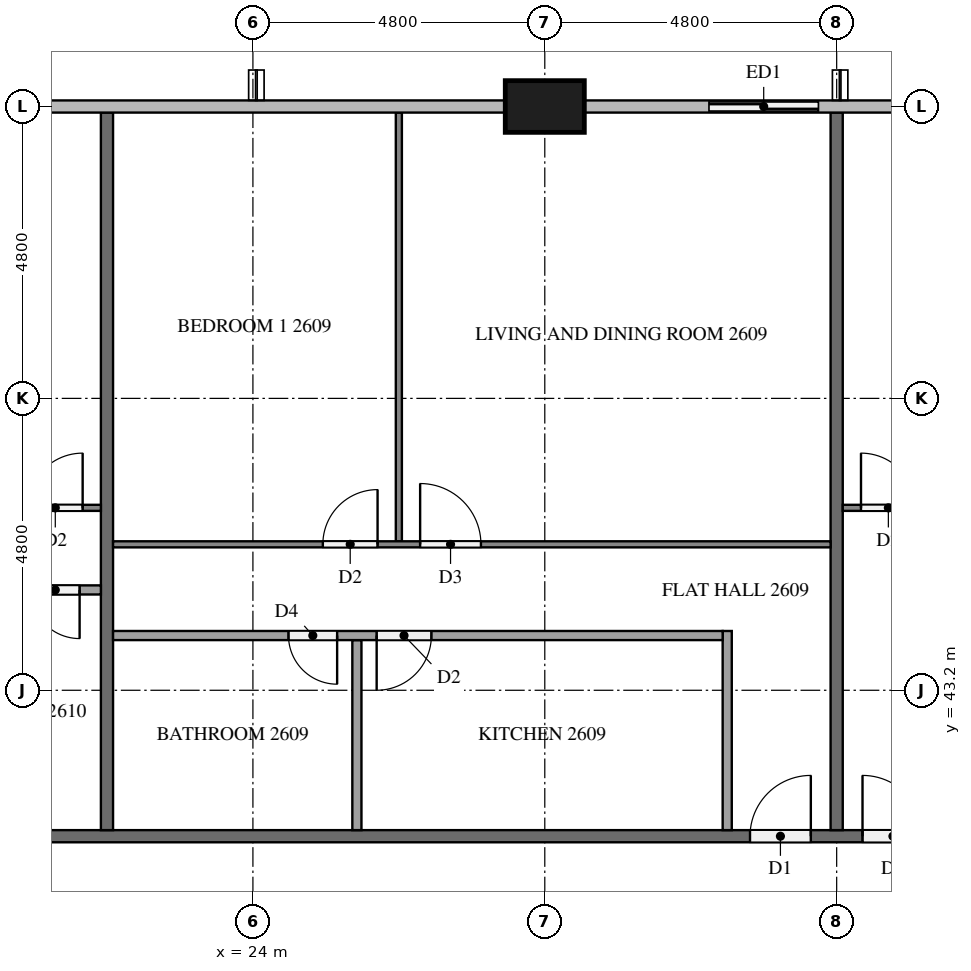
"""IFC4 building model, lengths in metres.
Left out: names, types, materials, properties, quantities, classifications, styles, units other than length and angle.
Written with IfcOpenShell. Run it as: python <this file> out.ifc"""

import sys

from ifc_helpers import new_model, si_unit, direction, frame, frame_2d, origin, origin_2d, place, context, subcontext, project, spatial, rectangle, extrude, element, fill, save


model = new_model("IFC4")
c1 = context("Model", 3, precision=1e-05, world=origin(), true_north=direction((0.0, 1.0)))
c2 = subcontext(c1, "Body", "Model", "MODEL_VIEW")
j1 = project(units=[si_unit("LENGTHUNIT", "METRE"), si_unit("PLANEANGLEUNIT", "RADIAN")], contexts=[c1])
p1 = place(None, origin())
s1 = spatial("IfcSite", under=j1, at=p1, CompositionType="ELEMENT")
p2 = place(p1, origin())
s2 = spatial("IfcBuilding", under=s1, at=p2, CompositionType="ELEMENT")
p3 = place(p2, frame((0.0, 0.0, 103.2)))
s3 = spatial("IfcBuildingStorey", under=s2, at=p3, CompositionType="ELEMENT", Elevation=103.2)
p4 = place(p3, frame((28.8, 52.8, 0.0), z_axis=(0.0, 0.0, 1.0), x_axis=(1.0, 0.0, 0.0)))
e1 = element("IfcColumn", 1, at=p4, inside=s3, PredefinedType="COLUMN", context=c2, shape_type="SweptSolid", body=[
    extrude(rectangle(XDim=1.3, YDim=0.85, at=origin_2d()), origin(), (0.0, 0.0, 1.0), 3.2),
])
p5 = place(p3, frame((33.6, 52.8, 0.0), z_axis=(0.0, 0.0, 1.0), x_axis=(-1.0, 0.0, 0.0)))
e2 = element("IfcWall", 2, at=p5, inside=s3, PredefinedType="SOLIDWALL", context=c2, shape_type="SweptSolid", body=[
    extrude(rectangle(XDim=2.4, YDim=0.15, at=frame_2d((1.2, 0.0))), origin(), (0.0, 0.0, 1.0), 3.2),
])
p6 = place(p5, frame((0.3, 0.0, 0.0)))
e3 = element("IfcOpeningElement", 3, at=p6, cuts=e2, PredefinedType="OPENING", context=c2, shape_type="SweptSolid", body=[
    extrude(rectangle(XDim=1.8, YDim=2.4, at=frame_2d((0.9, 1.2))), frame((0.0, 0.085, 0.0), z_axis=(0.0, -1.0, 0.0), x_axis=(1.0, 0.0, 0.0)), (0.0, 0.0, 1.0), 0.17),
])
p7 = place(p3, frame((11.9, 40.8, 0.0), z_axis=(0.0, 0.0, 1.0), x_axis=(1.0, 0.0, 0.0)))
e4 = element("IfcWall", 4, at=p7, inside=s3, PredefinedType="PARTITIONING", context=c2, shape_type="SweptSolid", body=[
    extrude(rectangle(XDim=38.6, YDim=0.2, at=frame_2d((19.3, 0.0))), origin(), (0.0, 0.0, 1.0), 3.2),
])
p8 = place(p7, frame((22.125, 0.0, 0.0)))
e5 = element("IfcOpeningElement", 5, at=p8, cuts=e4, PredefinedType="OPENING", context=c2, shape_type="SweptSolid", body=[
    extrude(rectangle(XDim=1.0, YDim=2.1, at=frame_2d((0.5, 1.05))), frame((0.0, 0.11, 0.0), z_axis=(0.0, -1.0, 0.0), x_axis=(1.0, 0.0, 0.0)), (0.0, 0.0, 1.0), 0.22),
])
p9 = place(p7, frame((20.275, 0.0, 0.0)))
e6 = element("IfcOpeningElement", 6, at=p9, cuts=e4, PredefinedType="OPENING", context=c2, shape_type="SweptSolid", body=[
    extrude(rectangle(XDim=1.0, YDim=2.1, at=frame_2d((0.5, 1.05))), frame((0.0, 0.11, 0.0), z_axis=(0.0, -1.0, 0.0), x_axis=(1.0, 0.0, 0.0)), (0.0, 0.0, 1.0), 0.22),
])
p10 = place(p7, frame((0.525, 0.0, 0.0)))
e7 = element("IfcOpeningElement", 7, at=p10, cuts=e4, PredefinedType="OPENING", context=c2, shape_type="SweptSolid", body=[
    extrude(rectangle(XDim=1.0, YDim=2.1, at=frame_2d((0.5, 1.05))), frame((0.0, 0.11, 0.0), z_axis=(0.0, -1.0, 0.0), x_axis=(1.0, 0.0, 0.0)), (0.0, 0.0, 1.0), 0.22),
])
for number, where, z_axis, x_axis in (
    (8, (33.6, 52.7, 0.0), (0.0, 0.0, 1.0), (0.0, -1.0, 0.0)),
    (9, (21.6, 52.7, 0.0), (0.0, 0.0, 1.0), (0.0, -1.0, 0.0)),
):
    element("IfcWall", number, at=place(p3, frame(where, z_axis=z_axis, x_axis=x_axis)), inside=s3, PredefinedType="PARTITIONING", context=c2, shape_type="SweptSolid", body=[
        extrude(rectangle(XDim=11.8, YDim=0.2, at=frame_2d((5.9, 0.0))), origin(), (0.0, 0.0, 1.0), 3.2),
    ])
p11 = place(p3, frame((33.7, 46.2, 0.0), z_axis=(0.0, 0.0, 1.0), x_axis=(1.0, 0.0, 0.0)))
e10 = element("IfcWall", 10, at=p11, inside=s3, PredefinedType="PARTITIONING", context=c2, shape_type="SweptSolid", body=[
    extrude(rectangle(XDim=16.6, YDim=0.1, at=frame_2d((8.3, 0.0))), origin(), (0.0, 0.0, 1.0), 3.2),
])
p12 = place(p11, frame((0.3, 0.0, 0.0)))
e11 = element("IfcOpeningElement", 11, at=p12, cuts=e10, PredefinedType="OPENING", context=c2, shape_type="SweptSolid", body=[
    extrude(rectangle(XDim=0.9, YDim=2.1, at=frame_2d((0.45, 1.05))), frame((0.0, 0.06, 0.0), z_axis=(0.0, -1.0, 0.0), x_axis=(1.0, 0.0, 0.0)), (0.0, 0.0, 1.0), 0.12),
])
p13 = place(p11, frame((10.55, 0.0, 0.0)))
e12 = element("IfcOpeningElement", 12, at=p13, cuts=e10, PredefinedType="OPENING", context=c2, shape_type="SweptSolid", body=[
    extrude(rectangle(XDim=1.0, YDim=2.1, at=frame_2d((0.5, 1.05))), frame((0.0, 0.06, 0.0), z_axis=(0.0, -1.0, 0.0), x_axis=(1.0, 0.0, 0.0)), (0.0, 0.0, 1.0), 0.12),
])
p14 = place(p11, frame((12.25, 0.0, 0.0)))
e13 = element("IfcOpeningElement", 13, at=p14, cuts=e10, PredefinedType="OPENING", context=c2, shape_type="SweptSolid", body=[
    extrude(rectangle(XDim=0.9, YDim=2.1, at=frame_2d((0.45, 1.05))), frame((0.0, 0.06, 0.0), z_axis=(0.0, -1.0, 0.0), x_axis=(1.0, 0.0, 0.0)), (0.0, 0.0, 1.0), 0.12),
])
p15 = place(p3, frame((26.4, 45.65, 0.0), z_axis=(0.0, 0.0, 1.0), x_axis=(0.0, 1.0, 0.0)))
e14 = element("IfcWall", 14, at=p15, inside=s3, PredefinedType="PARTITIONING", context=c2, shape_type="SweptSolid", body=[
    extrude(rectangle(XDim=7.05, YDim=0.1, at=frame_2d((3.525, 0.0))), origin(), (0.0, 0.0, 1.0), 3.2),
])
p16 = place(p3, frame((21.7, 45.6, 0.0), z_axis=(0.0, 0.0, 1.0), x_axis=(1.0, 0.0, 0.0)))
e15 = element("IfcWall", 15, at=p16, inside=s3, PredefinedType="PARTITIONING", context=c2, shape_type="SweptSolid", body=[
    extrude(rectangle(XDim=11.8, YDim=0.1, at=frame_2d((5.9, 0.0))), origin(), (0.0, 0.0, 1.0), 3.2),
])
p17 = place(p16, frame((5.05, 0.0, 0.0)))
e16 = element("IfcOpeningElement", 16, at=p17, cuts=e15, PredefinedType="OPENING", context=c2, shape_type="SweptSolid", body=[
    extrude(rectangle(XDim=1.0, YDim=2.1, at=frame_2d((0.5, 1.05))), frame((0.0, 0.06, 0.0), z_axis=(0.0, -1.0, 0.0), x_axis=(1.0, 0.0, 0.0)), (0.0, 0.0, 1.0), 0.12),
])
p18 = place(p16, frame((3.45, 0.0, 0.0)))
e17 = element("IfcOpeningElement", 17, at=p18, cuts=e15, PredefinedType="OPENING", context=c2, shape_type="SweptSolid", body=[
    extrude(rectangle(XDim=0.9, YDim=2.1, at=frame_2d((0.45, 1.05))), frame((0.0, 0.06, 0.0), z_axis=(0.0, -1.0, 0.0), x_axis=(1.0, 0.0, 0.0)), (0.0, 0.0, 1.0), 0.12),
])
p19 = place(p3, frame((25.71, 40.9, 0.0), z_axis=(0.0, 0.0, 1.0), x_axis=(0.0, 1.0, 0.0)))
e18 = element("IfcWall", 18, at=p19, inside=s3, PredefinedType="PARTITIONING", context=c2, shape_type="SweptSolid", body=[
    extrude(rectangle(XDim=3.125, YDim=0.15, at=frame_2d((1.562, 0.0))), origin(), (0.0, 0.0, 1.0), 3.2),
])
p20 = place(p3, frame((31.8, 40.9, 0.0), z_axis=(0.0, 0.0, 1.0), x_axis=(0.0, 1.0, 0.0)))
e19 = element("IfcWall", 19, at=p20, inside=s3, PredefinedType="PARTITIONING", context=c2, shape_type="SweptSolid", body=[
    extrude(rectangle(XDim=3.275, YDim=0.15, at=frame_2d((1.638, 0.0))), origin(), (0.0, 0.0, 1.0), 3.2),
])
p21 = place(p3, frame((31.725, 44.1, 0.0), z_axis=(0.0, 0.0, 1.0), x_axis=(-1.0, 0.0, 0.0)))
e20 = element("IfcWall", 20, at=p21, inside=s3, PredefinedType="PARTITIONING", context=c2, shape_type="SweptSolid", body=[
    extrude(rectangle(XDim=10.025, YDim=0.15, at=frame_2d((5.013, 0.0))), origin(), (0.0, 0.0, 1.0), 3.2),
])
p22 = place(p21, frame((4.79, 0.0, 0.0)))
e21 = element("IfcOpeningElement", 21, at=p22, cuts=e20, PredefinedType="OPENING", context=c2, shape_type="SweptSolid", body=[
    extrude(rectangle(XDim=0.9, YDim=2.1, at=frame_2d((0.45, 1.05))), frame((0.0, 0.085, 0.0), z_axis=(0.0, -1.0, 0.0), x_axis=(1.0, 0.0, 0.0)), (0.0, 0.0, 1.0), 0.17),
])
p23 = place(p21, frame((6.34, 0.0, 0.0)))
e22 = element("IfcOpeningElement", 22, at=p23, cuts=e20, PredefinedType="OPENING", context=c2, shape_type="SweptSolid", body=[
    extrude(rectangle(XDim=0.8, YDim=2.1, at=frame_2d((0.4, 1.05))), frame((0.0, 0.085, 0.0), z_axis=(0.0, -1.0, 0.0), x_axis=(1.0, 0.0, 0.0)), (0.0, 0.0, 1.0), 0.17),
])
p24 = place(p3, frame((12.1, 46.2, 0.0), z_axis=(0.0, 0.0, 1.0), x_axis=(1.0, 0.0, 0.0)))
e23 = element("IfcWall", 23, at=p24, inside=s3, PredefinedType="PARTITIONING", context=c2, shape_type="SweptSolid", body=[
    extrude(rectangle(XDim=9.4, YDim=0.1, at=frame_2d((4.7, 0.0))), origin(), (0.0, 0.0, 1.0), 3.2),
])
p25 = place(p24, frame((0.3, 0.0, 0.0)))
e24 = element("IfcOpeningElement", 24, at=p25, cuts=e23, PredefinedType="OPENING", context=c2, shape_type="SweptSolid", body=[
    extrude(rectangle(XDim=1.0, YDim=2.1, at=frame_2d((0.5, 1.05))), frame((0.0, 0.06, 0.0), z_axis=(0.0, -1.0, 0.0), x_axis=(1.0, 0.0, 0.0)), (0.0, 0.0, 1.0), 0.12),
])
p26 = place(p24, frame((8.2, 0.0, 0.0)))
e25 = element("IfcOpeningElement", 25, at=p26, cuts=e23, PredefinedType="OPENING", context=c2, shape_type="SweptSolid", body=[
    extrude(rectangle(XDim=0.9, YDim=2.1, at=frame_2d((0.45, 1.05))), frame((0.0, 0.06, 0.0), z_axis=(0.0, -1.0, 0.0), x_axis=(1.0, 0.0, 0.0)), (0.0, 0.0, 1.0), 0.12),
])
p27 = place(p3, frame((21.5, 44.85, 0.0), z_axis=(0.0, 0.0, 1.0), x_axis=(-1.0, 0.0, 0.0)))
e26 = element("IfcWall", 26, at=p27, inside=s3, PredefinedType="PARTITIONING", context=c2, shape_type="SweptSolid", body=[
    extrude(rectangle(XDim=7.625, YDim=0.15, at=frame_2d((3.812, 0.0))), origin(), (0.0, 0.0, 1.0), 3.2),
])
p28 = place(p27, frame((6.425, 0.0, 0.0)))
e27 = element("IfcOpeningElement", 27, at=p28, cuts=e26, PredefinedType="OPENING", context=c2, shape_type="SweptSolid", body=[
    extrude(rectangle(XDim=0.9, YDim=2.1, at=frame_2d((0.45, 1.05))), frame((0.0, 0.085, 0.0), z_axis=(0.0, -1.0, 0.0), x_axis=(1.0, 0.0, 0.0)), (0.0, 0.0, 1.0), 0.17),
])
p29 = place(p27, frame((0.35, 0.0, 0.0)))
e28 = element("IfcOpeningElement", 28, at=p29, cuts=e26, PredefinedType="OPENING", context=c2, shape_type="SweptSolid", body=[
    extrude(rectangle(XDim=0.8, YDim=2.1, at=frame_2d((0.4, 1.05))), frame((0.0, 0.085, 0.0), z_axis=(0.0, -1.0, 0.0), x_axis=(1.0, 0.0, 0.0)), (0.0, 0.0, 1.0), 0.17),
])
p30 = place(p6, origin())
e29 = element("IfcDoor", 29, at=p30, inside=s3, OperationType="SLIDING_TO_LEFT", PredefinedType="DOOR", context=c2, shape_type="SweptSolid", body=[
    extrude(rectangle(XDim=1.8, YDim=2.4, at=frame_2d((0.9, 1.2))), frame((0.0, 0.025, 0.0), z_axis=(0.0, -1.0, 0.0), x_axis=(1.0, 0.0, 0.0)), (0.0, 0.0, 1.0), 0.05),
])
fill(e3, e29)
p31 = place(p8, origin())
e30 = element("IfcDoor", 30, at=p31, inside=s3, OperationType="SINGLE_SWING_LEFT", PredefinedType="DOOR", context=c2, shape_type="SweptSolid", body=[
    extrude(rectangle(XDim=1.0, YDim=2.1, at=frame_2d((0.5, 1.05))), frame((0.0, 0.025, 0.0), z_axis=(0.0, -1.0, 0.0), x_axis=(1.0, 0.0, 0.0)), (0.0, 0.0, 1.0), 0.05),
])
fill(e5, e30)
p32 = place(p9, origin())
e31 = element("IfcDoor", 31, at=p32, inside=s3, OperationType="SINGLE_SWING_RIGHT", PredefinedType="DOOR", context=c2, shape_type="SweptSolid", body=[
    extrude(rectangle(XDim=1.0, YDim=2.1, at=frame_2d((0.5, 1.05))), frame((0.0, 0.025, 0.0), z_axis=(0.0, -1.0, 0.0), x_axis=(1.0, 0.0, 0.0)), (0.0, 0.0, 1.0), 0.05),
])
fill(e6, e31)
p33 = place(p12, origin())
e32 = element("IfcDoor", 32, at=p33, inside=s3, OperationType="SINGLE_SWING_LEFT", PredefinedType="DOOR", context=c2, shape_type="SweptSolid", body=[
    extrude(rectangle(XDim=0.9, YDim=2.1, at=frame_2d((0.45, 1.05))), frame((0.0, 0.025, 0.0), z_axis=(0.0, -1.0, 0.0), x_axis=(1.0, 0.0, 0.0)), (0.0, 0.0, 1.0), 0.05),
])
fill(e11, e32)
p34 = place(p17, origin())
e33 = element("IfcDoor", 33, at=p34, inside=s3, OperationType="SINGLE_SWING_LEFT", PredefinedType="DOOR", context=c2, shape_type="SweptSolid", body=[
    extrude(rectangle(XDim=1.0, YDim=2.1, at=frame_2d((0.5, 1.05))), frame((0.0, 0.025, 0.0), z_axis=(0.0, -1.0, 0.0), x_axis=(1.0, 0.0, 0.0)), (0.0, 0.0, 1.0), 0.05),
])
fill(e16, e33)
p35 = place(p18, origin())
e34 = element("IfcDoor", 34, at=p35, inside=s3, OperationType="SINGLE_SWING_RIGHT", PredefinedType="DOOR", context=c2, shape_type="SweptSolid", body=[
    extrude(rectangle(XDim=0.9, YDim=2.1, at=frame_2d((0.45, 1.05))), frame((0.0, 0.025, 0.0), z_axis=(0.0, -1.0, 0.0), x_axis=(1.0, 0.0, 0.0)), (0.0, 0.0, 1.0), 0.05),
])
fill(e17, e34)
p36 = place(p22, origin())
e35 = element("IfcDoor", 35, at=p36, inside=s3, OperationType="SINGLE_SWING_RIGHT", PredefinedType="DOOR", context=c2, shape_type="SweptSolid", body=[
    extrude(rectangle(XDim=0.9, YDim=2.1, at=frame_2d((0.45, 1.05))), frame((0.0, 0.025, 0.0), z_axis=(0.0, -1.0, 0.0), x_axis=(1.0, 0.0, 0.0)), (0.0, 0.0, 1.0), 0.05),
])
fill(e21, e35)
p37 = place(p23, origin())
e36 = element("IfcDoor", 36, at=p37, inside=s3, OperationType="SINGLE_SWING_LEFT", PredefinedType="DOOR", context=c2, shape_type="SweptSolid", body=[
    extrude(rectangle(XDim=0.8, YDim=2.1, at=frame_2d((0.4, 1.05))), frame((0.0, 0.025, 0.0), z_axis=(0.0, -1.0, 0.0), x_axis=(1.0, 0.0, 0.0)), (0.0, 0.0, 1.0), 0.05),
])
fill(e22, e36)
p38 = place(p26, origin())
e37 = element("IfcDoor", 37, at=p38, inside=s3, OperationType="SINGLE_SWING_RIGHT", PredefinedType="DOOR", context=c2, shape_type="SweptSolid", body=[
    extrude(rectangle(XDim=0.9, YDim=2.1, at=frame_2d((0.45, 1.05))), frame((0.0, 0.025, 0.0), z_axis=(0.0, -1.0, 0.0), x_axis=(1.0, 0.0, 0.0)), (0.0, 0.0, 1.0), 0.05),
])
fill(e25, e37)
p39 = place(p29, origin())
e38 = element("IfcDoor", 38, at=p39, inside=s3, OperationType="SINGLE_SWING_LEFT", PredefinedType="DOOR", context=c2, shape_type="SweptSolid", body=[
    extrude(rectangle(XDim=0.8, YDim=2.1, at=frame_2d((0.4, 1.05))), frame((0.0, 0.025, 0.0), z_axis=(0.0, -1.0, 0.0), x_axis=(1.0, 0.0, 0.0)), (0.0, 0.0, 1.0), 0.05),
])
fill(e28, e38)
save(model, sys.argv[1])
